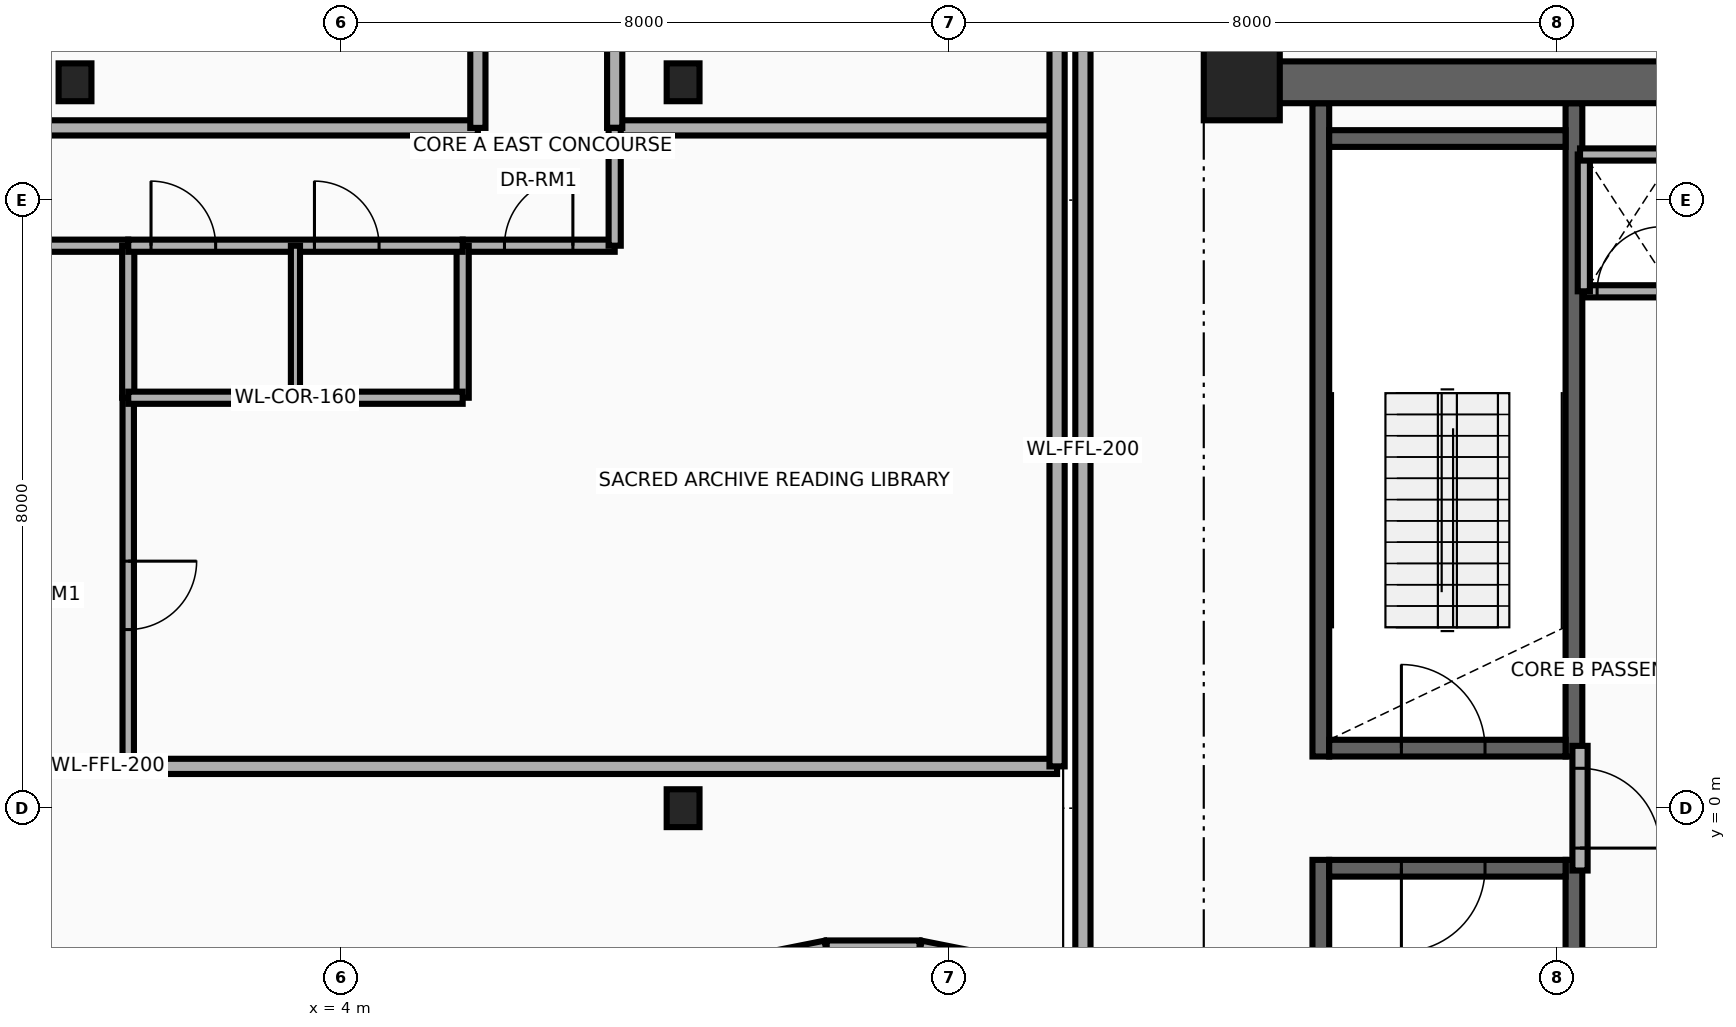
"""IFC4 building model, lengths in metres.
Left out: names, types, materials, properties, quantities, classifications, styles, units other than length and angle.
Written with IfcOpenShell. Run it as: python <this file> out.ifc"""

import sys

from ifc_helpers import new_model, si_unit, direction, frame, frame_2d, origin, origin_2d, place, context, subcontext, project, spatial, rectangle, i_section, extrude, source, transform, mapped, element, fill, save


model = new_model("IFC4")
c1 = context("Model", 3, precision=1e-05, world=origin(), true_north=direction((0.0, 1.0)))
c2 = subcontext(c1, "Body", "Model", "MODEL_VIEW")
j1 = project(units=[si_unit("LENGTHUNIT", "METRE"), si_unit("PLANEANGLEUNIT", "RADIAN")], contexts=[c1])
p1 = place(None, origin())
s1 = spatial("IfcSite", under=j1, at=p1, CompositionType="ELEMENT")
p2 = place(p1, origin())
s2 = spatial("IfcBuilding", under=s1, at=p2, CompositionType="ELEMENT")
p3 = place(p2, frame((0.0, 0.0, 172.3)))
s3 = spatial("IfcBuildingStorey", under=s2, at=p3, CompositionType="ELEMENT", Elevation=172.3)
for number, where, z_axis, x_axis in (
    (1, (16.89, 0.68, 0.0), (0.0, 0.0, 1.0), (0.0, 1.0, 0.0)),
    (2, (20.22, 0.68, 0.0), (0.0, 0.0, 1.0), (0.0, 1.0, 0.0)),
):
    element("IfcWall", number, at=place(p3, frame(where, z_axis=z_axis, x_axis=x_axis)), inside=s3, PredefinedType="SHEAR", context=c2, shape_type="SweptSolid", body=[
        extrude(rectangle(XDim=8.595, YDim=0.22, at=frame_2d((4.297, 0.0))), origin(), (0.0, 0.0, 1.0), 3.93),
    ])
p4 = place(p3, frame((17.0, 0.79, 0.0), z_axis=(0.0, 0.0, 1.0), x_axis=(1.0, 0.0, 0.0)))
e3 = element("IfcWall", 3, at=p4, inside=s3, PredefinedType="SHEAR", context=c2, shape_type="SweptSolid", body=[
    extrude(rectangle(XDim=3.11, YDim=0.22, at=frame_2d((1.555, 0.0))), origin(), (0.0, 0.0, 1.0), 3.93),
])
p5 = place(p4, frame((0.95, 0.0, 0.0)))
e4 = element("IfcOpeningElement", 4, at=p5, cuts=e3, PredefinedType="OPENING", context=c2, shape_type="SweptSolid", body=[
    extrude(rectangle(XDim=1.1, YDim=2.15, at=frame_2d((0.55, 1.075))), frame((0.0, 0.125, 0.0), z_axis=(0.0, -1.0, 0.0), x_axis=(1.0, 0.0, 0.0)), (0.0, 0.0, 1.0), 0.25),
])
p6 = place(p3, frame((17.0, 8.81, 0.0), z_axis=(0.0, 0.0, 1.0), x_axis=(1.0, 0.0, 0.0)))
e5 = element("IfcWall", 5, at=p6, inside=s3, PredefinedType="SHEAR", context=c2, shape_type="SweptSolid", body=[
    extrude(rectangle(XDim=3.11, YDim=0.22, at=frame_2d((1.555, 0.0))), origin(), (0.0, 0.0, 1.0), 3.93),
])
for number, where, z_axis, x_axis in (
    (6, (16.89, -9.275, 0.0), (0.0, 0.0, 1.0), (0.0, 1.0, 0.0)),
    (7, (20.22, -9.275, 0.0), (0.0, 0.0, 1.0), (0.0, 1.0, 0.0)),
):
    element("IfcWall", number, at=place(p3, frame(where, z_axis=z_axis, x_axis=x_axis)), inside=s3, PredefinedType="SHEAR", context=c2, shape_type="SweptSolid", body=[
        extrude(rectangle(XDim=8.595, YDim=0.22, at=frame_2d((4.297, 0.0))), origin(), (0.0, 0.0, 1.0), 3.93),
    ])
p7 = place(p3, frame((17.0, -0.79, 0.0), z_axis=(0.0, 0.0, 1.0), x_axis=(1.0, 0.0, 0.0)))
e8 = element("IfcWall", 8, at=p7, inside=s3, PredefinedType="SHEAR", context=c2, shape_type="SweptSolid", body=[
    extrude(rectangle(XDim=3.11, YDim=0.22, at=frame_2d((1.555, 0.0))), origin(), (0.0, 0.0, 1.0), 3.93),
])
p8 = place(p7, frame((0.95, 0.0, 0.0)))
e9 = element("IfcOpeningElement", 9, at=p8, cuts=e8, PredefinedType="OPENING", context=c2, shape_type="SweptSolid", body=[
    extrude(rectangle(XDim=1.1, YDim=2.15, at=frame_2d((0.55, 1.075))), frame((0.0, 0.125, 0.0), z_axis=(0.0, -1.0, 0.0), x_axis=(1.0, 0.0, 0.0)), (0.0, 0.0, 1.0), 0.25),
])
p9 = place(p3, frame((15.85, 9.55, 0.0), z_axis=(0.0, 0.0, 1.0), x_axis=(1.0, 0.0, 0.0)))
e10 = element("IfcWall", 10, at=p9, inside=s3, PredefinedType="SHEAR", context=c2, shape_type="SweptSolid", body=[
    extrude(rectangle(XDim=9.0, YDim=0.55, at=frame_2d((4.5, 0.0))), origin(), (0.0, 0.0, 1.0), 3.93),
])
m1 = source(origin(), c2, "Body", "SweptSolid", [
    extrude(rectangle(XDim=1.0, YDim=1.0, at=origin_2d()), origin(), (0.0, 0.0, 1.0), 4.25),
])
p10 = place(p3, frame((15.85, 9.55, 0.0), z_axis=(0.0, 0.0, 1.0), x_axis=(1.0, 0.0, 0.0)))
e11 = element("IfcColumn", 11, at=p10, inside=s3, PredefinedType="COLUMN", context=c2, shape_type="MappedRepresentation", body=[
    mapped(m1, transform((0.0, 0.0, 0.0), x_axis=(1.0, 0.0, 0.0), y_axis=(0.0, 1.0, 0.0), z_axis=(0.0, 0.0, 1.0), scale=1.0)),
])
m2 = source(origin(), c2, "Body", "SweptSolid", [
    extrude(i_section(OverallWidth=0.432, OverallDepth=0.498, WebThickness=0.056, FlangeThickness=0.089, at=origin_2d()), origin(), (0.0, 0.0, 1.0), 4.25),
])
for number, where, z_axis, x_axis in (
    (12, (8.5, 0.0, 0.0), (0.0, 0.0, 1.0), (1.0, 0.0, 0.0)),
    (13, (8.5, 9.55, 0.0), (0.0, 0.0, 1.0), (1.0, 0.0, 0.0)),
    (14, (0.5, 9.55, 0.0), (0.0, 0.0, 1.0), (1.0, 0.0, 0.0)),
):
    element("IfcColumn", number, at=place(p3, frame(where, z_axis=z_axis, x_axis=x_axis)), inside=s3, PredefinedType="COLUMN", context=c2, shape_type="MappedRepresentation", body=[
        mapped(m2, transform((0.0, 0.0, 0.0), x_axis=(1.0, 0.0, 0.0), y_axis=(0.0, 1.0, 0.0), z_axis=(0.0, 0.0, 1.0), scale=1.0)),
    ])
p11 = place(p3, frame((12.37, -2.041, 0.0), z_axis=(0.0, 0.0, 1.0), x_axis=(-0.98076219082, 0.195206365311, 0.0)))
e15 = element("IfcWall", 15, at=p11, inside=s3, PredefinedType="SOLIDWALL", context=c2, shape_type="SweptSolid", body=[
    extrude(rectangle(XDim=0.774, YDim=0.3, at=frame_2d((0.387, 0.0))), origin(), (0.0, 0.0, 1.0), 2.715),
])
p12 = place(p3, frame((11.611, -1.89, 0.0), z_axis=(0.0, 0.0, 1.0), x_axis=(-1.0, 0.0, 0.0)))
e16 = element("IfcWall", 16, at=p12, inside=s3, PredefinedType="SOLIDWALL", context=c2, shape_type="SweptSolid", body=[
    extrude(rectangle(XDim=1.222, YDim=0.3, at=frame_2d((0.611, 0.0))), origin(), (0.0, 0.0, 1.0), 3.93),
])
p13 = place(p3, frame((10.389, -1.89, 0.0), z_axis=(0.0, 0.0, 1.0), x_axis=(-0.98076219082, -0.195206365311, 0.0)))
e17 = element("IfcWall", 17, at=p13, inside=s3, PredefinedType="SOLIDWALL", context=c2, shape_type="SweptSolid", body=[
    extrude(rectangle(XDim=0.774, YDim=0.3, at=frame_2d((0.387, 0.0))), origin(), (0.0, 0.0, 1.0), 3.93),
])
p14 = place(p3, frame((20.3, -0.82, 0.0), z_axis=(0.0, 0.0, 1.0), x_axis=(0.0, 1.0, 0.0)))
e18 = element("IfcWall", 18, at=p14, inside=s3, PredefinedType="PARTITIONING", context=c2, shape_type="SweptSolid", body=[
    extrude(rectangle(XDim=1.64, YDim=0.2, at=frame_2d((0.82, 0.0))), origin(), (0.0, 0.0, 1.0), 3.93),
])
p15 = place(p14, frame((0.295, 0.0, 0.0)))
e19 = element("IfcOpeningElement", 19, at=p15, cuts=e18, PredefinedType="OPENING", context=c2, shape_type="SweptSolid", body=[
    extrude(rectangle(XDim=1.05, YDim=2.15, at=frame_2d((0.525, 1.075))), frame((0.0, 0.115, 0.0), z_axis=(0.0, -1.0, 0.0), x_axis=(1.0, 0.0, 0.0)), (0.0, 0.0, 1.0), 0.23),
])
p16 = place(p3, frame((20.35, 6.8, 0.0), z_axis=(0.0, 0.0, 1.0), x_axis=(1.0, 0.0, 0.0)))
e20 = element("IfcWall", 20, at=p16, inside=s3, PredefinedType="PARTITIONING", context=c2, shape_type="SweptSolid", body=[
    extrude(rectangle(XDim=1.2, YDim=0.16, at=frame_2d((0.6, 0.0))), origin(), (0.0, 0.0, 1.0), 3.93),
])
p17 = place(p16, frame((0.175, 0.0, 0.0)))
e21 = element("IfcOpeningElement", 21, at=p17, cuts=e20, PredefinedType="OPENING", context=c2, shape_type="SweptSolid", body=[
    extrude(rectangle(XDim=0.85, YDim=2.05, at=frame_2d((0.425, 1.025))), frame((0.0, 0.095, 0.0), z_axis=(0.0, -1.0, 0.0), x_axis=(1.0, 0.0, 0.0)), (0.0, 0.0, 1.0), 0.19),
])
p18 = place(p3, frame((20.35, 6.8, 0.0), z_axis=(0.0, 0.0, 1.0), x_axis=(0.0, 1.0, 0.0)))
e22 = element("IfcWall", 22, at=p18, inside=s3, PredefinedType="PARTITIONING", context=c2, shape_type="SweptSolid", body=[
    extrude(rectangle(XDim=1.8, YDim=0.16, at=frame_2d((0.9, 0.0))), origin(), (0.0, 0.0, 1.0), 3.93),
])
p19 = place(p3, frame((20.3, 8.6, 0.0), z_axis=(0.0, 0.0, 1.0), x_axis=(1.0, 0.0, 0.0)))
e23 = element("IfcWall", 23, at=p19, inside=s3, PredefinedType="PARTITIONING", context=c2, shape_type="SweptSolid", body=[
    extrude(rectangle(XDim=1.82, YDim=0.16, at=frame_2d((0.91, 0.0))), origin(), (0.0, 0.0, 1.0), 3.93),
])
p20 = place(p3, frame((-11.55, 0.55, 0.0), z_axis=(0.0, 0.0, 1.0), x_axis=(1.0, 0.0, 0.0)))
e24 = element("IfcWall", 24, at=p20, inside=s3, PredefinedType="PARTITIONING", context=c2, shape_type="SweptSolid", body=[
    extrude(rectangle(XDim=24.97, YDim=0.2, at=frame_2d((12.485, 0.0))), origin(), (0.0, 0.0, 1.0), 2.715),
])
p21 = place(p3, frame((-11.55, 8.95, 0.0), z_axis=(0.0, 0.0, 1.0), x_axis=(1.0, 0.0, 0.0)))
e25 = element("IfcWall", 25, at=p21, inside=s3, PredefinedType="PARTITIONING", context=c2, shape_type="SweptSolid", body=[
    extrude(rectangle(XDim=17.35, YDim=0.2, at=frame_2d((8.675, 0.0))), origin(), (0.0, 0.0, 1.0), 2.715),
])
p22 = place(p3, frame((7.6, 8.95, 0.0), z_axis=(0.0, 0.0, 1.0), x_axis=(1.0, 0.0, 0.0)))
e26 = element("IfcWall", 26, at=p22, inside=s3, PredefinedType="PARTITIONING", context=c2, shape_type="SweptSolid", body=[
    extrude(rectangle(XDim=5.82, YDim=0.2, at=frame_2d((2.91, 0.0))), origin(), (0.0, 0.0, 1.0), 2.715),
])
for number, where, z_axis, x_axis in (
    (27, (5.8, 8.95, 0.0), (0.0, 0.0, 1.0), (0.0, 1.0, 0.0)),
    (28, (7.6, 8.95, 0.0), (0.0, 0.0, 1.0), (0.0, 1.0, 0.0)),
):
    element("IfcWall", number, at=place(p3, frame(where, z_axis=z_axis, x_axis=x_axis)), inside=s3, PredefinedType="PARTITIONING", context=c2, shape_type="SweptSolid", body=[
        extrude(rectangle(XDim=2.47, YDim=0.2, at=frame_2d((1.235, 0.0))), origin(), (0.0, 0.0, 1.0), 2.715),
    ])
p23 = place(p3, frame((13.42, 0.55, 0.0), z_axis=(0.0, 0.0, 1.0), x_axis=(0.0, 1.0, 0.0)))
e29 = element("IfcWall", 29, at=p23, inside=s3, PredefinedType="PARTITIONING", context=c2, shape_type="SweptSolid", body=[
    extrude(rectangle(XDim=10.87, YDim=0.2, at=frame_2d((5.435, 0.0))), origin(), (0.0, 0.0, 1.0), 2.715),
])
p24 = place(p3, frame((13.76, -2.0, 0.0), z_axis=(0.0, 0.0, 1.0), x_axis=(0.0, 1.0, 0.0)))
e30 = element("IfcWall", 30, at=p24, inside=s3, PredefinedType="PARTITIONING", context=c2, shape_type="SweptSolid", body=[
    extrude(rectangle(XDim=13.42, YDim=0.2, at=frame_2d((6.71, 0.0))), origin(), (0.0, 0.0, 1.0), 2.715),
])
p25 = place(p3, frame((-10.05, 7.4, 0.0), z_axis=(0.0, 0.0, 1.0), x_axis=(1.0, 0.0, 0.0)))
e31 = element("IfcWall", 31, at=p25, inside=s3, PredefinedType="PARTITIONING", context=c2, shape_type="SweptSolid", body=[
    extrude(rectangle(XDim=11.25, YDim=0.16, at=frame_2d((5.625, 0.0))), origin(), (0.0, 0.0, 1.0), 2.915),
])
p26 = place(p25, frame((4.2, 0.0, 0.0)))
e32 = element("IfcOpeningElement", 32, at=p26, cuts=e31, PredefinedType="OPENING", context=c2, shape_type="SweptSolid", body=[
    extrude(rectangle(XDim=1.8, YDim=2.15, at=frame_2d((0.9, 1.075))), frame((0.0, 0.095, 0.0), z_axis=(0.0, -1.0, 0.0), x_axis=(1.0, 0.0, 0.0)), (0.0, 0.0, 1.0), 0.19),
])
p27 = place(p3, frame((5.6, 7.4, 0.0), z_axis=(0.0, 0.0, 1.0), x_axis=(1.0, 0.0, 0.0)))
e33 = element("IfcWall", 33, at=p27, inside=s3, PredefinedType="PARTITIONING", context=c2, shape_type="SweptSolid", body=[
    extrude(rectangle(XDim=2.0, YDim=0.16, at=frame_2d((1.0, 0.0))), origin(), (0.0, 0.0, 1.0), 3.93),
])
p28 = place(p27, frame((0.55, 0.0, 0.0)))
e34 = element("IfcOpeningElement", 34, at=p28, cuts=e33, PredefinedType="OPENING", context=c2, shape_type="SweptSolid", body=[
    extrude(rectangle(XDim=0.9, YDim=2.1, at=frame_2d((0.45, 1.05))), frame((0.0, 0.095, 0.0), z_axis=(0.0, -1.0, 0.0), x_axis=(1.0, 0.0, 0.0)), (0.0, 0.0, 1.0), 0.19),
])
p29 = place(p3, frame((7.6, 7.4, 0.0), z_axis=(0.0, 0.0, 1.0), x_axis=(0.0, 1.0, 0.0)))
e35 = element("IfcWall", 35, at=p29, inside=s3, PredefinedType="PARTITIONING", context=c2, shape_type="SweptSolid", body=[
    extrude(rectangle(XDim=1.55, YDim=0.16, at=frame_2d((0.775, 0.0))), origin(), (0.0, 0.0, 1.0), 2.715),
])
p30 = place(p3, frame((1.2, 0.55, 0.0), z_axis=(0.0, 0.0, 1.0), x_axis=(0.0, 1.0, 0.0)))
e36 = element("IfcWall", 36, at=p30, inside=s3, PredefinedType="PARTITIONING", context=c2, shape_type="SweptSolid", body=[
    extrude(rectangle(XDim=4.85, YDim=0.15, at=frame_2d((2.425, 0.0))), origin(), (0.0, 0.0, 1.0), 2.715),
])
p31 = place(p30, frame((1.8, 0.0, 0.0)))
e37 = element("IfcOpeningElement", 37, at=p31, cuts=e36, PredefinedType="OPENING", context=c2, shape_type="SweptSolid", body=[
    extrude(rectangle(XDim=0.9, YDim=2.1, at=frame_2d((0.45, 1.05))), frame((0.0, 0.09, 0.0), z_axis=(0.0, -1.0, 0.0), x_axis=(1.0, 0.0, 0.0)), (0.0, 0.0, 1.0), 0.18),
])
for number, where, z_axis, x_axis in (
    (38, (1.2, 5.4, 0.0), (0.0, 0.0, 1.0), (0.0, 1.0, 0.0)),
    (39, (5.6, 5.4, 0.0), (0.0, 0.0, 1.0), (0.0, 1.0, 0.0)),
):
    element("IfcWall", number, at=place(p3, frame(where, z_axis=z_axis, x_axis=x_axis)), inside=s3, PredefinedType="PARTITIONING", context=c2, shape_type="SweptSolid", body=[
        extrude(rectangle(XDim=2.0, YDim=0.16, at=frame_2d((1.0, 0.0))), origin(), (0.0, 0.0, 1.0), 3.93),
    ])
p32 = place(p3, frame((1.2, 5.4, 0.0), z_axis=(0.0, 0.0, 1.0), x_axis=(1.0, 0.0, 0.0)))
e40 = element("IfcWall", 40, at=p32, inside=s3, PredefinedType="PARTITIONING", context=c2, shape_type="SweptSolid", body=[
    extrude(rectangle(XDim=4.4, YDim=0.16, at=frame_2d((2.2, 0.0))), origin(), (0.0, 0.0, 1.0), 3.93),
])
p33 = place(p3, frame((1.2, 7.4, 0.0), z_axis=(0.0, 0.0, 1.0), x_axis=(1.0, 0.0, 0.0)))
e41 = element("IfcWall", 41, at=p33, inside=s3, PredefinedType="PARTITIONING", context=c2, shape_type="SweptSolid", body=[
    extrude(rectangle(XDim=4.4, YDim=0.16, at=frame_2d((2.2, 0.0))), origin(), (0.0, 0.0, 1.0), 3.93),
])
p34 = place(p33, frame((0.3, 0.0, 0.0)))
e42 = element("IfcOpeningElement", 42, at=p34, cuts=e41, PredefinedType="OPENING", context=c2, shape_type="SweptSolid", body=[
    extrude(rectangle(XDim=0.85, YDim=2.1, at=frame_2d((0.425, 1.05))), frame((0.0, 0.095, 0.0), z_axis=(0.0, -1.0, 0.0), x_axis=(1.0, 0.0, 0.0)), (0.0, 0.0, 1.0), 0.19),
])
p35 = place(p33, frame((2.45, 0.0, 0.0)))
e43 = element("IfcOpeningElement", 43, at=p35, cuts=e41, PredefinedType="OPENING", context=c2, shape_type="SweptSolid", body=[
    extrude(rectangle(XDim=0.85, YDim=2.1, at=frame_2d((0.425, 1.05))), frame((0.0, 0.095, 0.0), z_axis=(0.0, -1.0, 0.0), x_axis=(1.0, 0.0, 0.0)), (0.0, 0.0, 1.0), 0.19),
])
p36 = place(p3, frame((3.4, 5.4, 0.0), z_axis=(0.0, 0.0, 1.0), x_axis=(0.0, 1.0, 0.0)))
e44 = element("IfcWall", 44, at=p36, inside=s3, PredefinedType="PARTITIONING", context=c2, shape_type="SweptSolid", body=[
    extrude(rectangle(XDim=2.0, YDim=0.12, at=frame_2d((1.0, 0.0))), origin(), (0.0, 0.0, 1.0), 3.93),
])
p37 = place(p15, frame((1.05, 0.0, 0.0), z_axis=(0.0, 0.0, 1.0), x_axis=(-1.0, 0.0, 0.0)))
e45 = element("IfcDoor", 45, at=p37, inside=s3, OperationType="SINGLE_SWING_LEFT", PredefinedType="DOOR", context=c2, shape_type="SweptSolid", body=[
    extrude(rectangle(XDim=1.05, YDim=2.15, at=frame_2d((0.525, 1.075))), frame((0.0, 0.025, 0.0), z_axis=(0.0, -1.0, 0.0), x_axis=(1.0, 0.0, 0.0)), (0.0, 0.0, 1.0), 0.05),
])
fill(e19, e45)
p38 = place(p5, origin())
e46 = element("IfcDoor", 46, at=p38, inside=s3, OperationType="SINGLE_SWING_RIGHT", PredefinedType="DOOR", context=c2, shape_type="SweptSolid", body=[
    extrude(rectangle(XDim=1.1, YDim=2.15, at=frame_2d((0.55, 1.075))), frame((0.0, 0.025, 0.0), z_axis=(0.0, -1.0, 0.0), x_axis=(1.0, 0.0, 0.0)), (0.0, 0.0, 1.0), 0.05),
])
fill(e4, e46)
p39 = place(p8, frame((1.1, 0.0, 0.0), z_axis=(0.0, 0.0, 1.0), x_axis=(-1.0, 0.0, 0.0)))
e47 = element("IfcDoor", 47, at=p39, inside=s3, OperationType="SINGLE_SWING_LEFT", PredefinedType="DOOR", context=c2, shape_type="SweptSolid", body=[
    extrude(rectangle(XDim=1.1, YDim=2.15, at=frame_2d((0.55, 1.075))), frame((0.0, 0.025, 0.0), z_axis=(0.0, -1.0, 0.0), x_axis=(1.0, 0.0, 0.0)), (0.0, 0.0, 1.0), 0.05),
])
fill(e9, e47)
p40 = place(p17, origin())
e48 = element("IfcDoor", 48, at=p40, inside=s3, OperationType="SINGLE_SWING_RIGHT", PredefinedType="DOOR", context=c2, shape_type="SweptSolid", body=[
    extrude(rectangle(XDim=0.85, YDim=2.05, at=frame_2d((0.425, 1.025))), frame((0.0, 0.025, 0.0), z_axis=(0.0, -1.0, 0.0), x_axis=(1.0, 0.0, 0.0)), (0.0, 0.0, 1.0), 0.05),
])
fill(e21, e48)
p41 = place(p28, origin())
e49 = element("IfcDoor", 49, at=p41, inside=s3, OperationType="SINGLE_SWING_RIGHT", PredefinedType="DOOR", context=c2, shape_type="SweptSolid", body=[
    extrude(rectangle(XDim=0.9, YDim=2.1, at=frame_2d((0.45, 1.05))), frame((0.0, 0.025, 0.0), z_axis=(0.0, -1.0, 0.0), x_axis=(1.0, 0.0, 0.0)), (0.0, 0.0, 1.0), 0.05),
])
fill(e34, e49)
p42 = place(p31, frame((0.9, 0.0, 0.0), z_axis=(0.0, 0.0, 1.0), x_axis=(-1.0, 0.0, 0.0)))
e50 = element("IfcDoor", 50, at=p42, inside=s3, OperationType="SINGLE_SWING_LEFT", PredefinedType="DOOR", context=c2, shape_type="SweptSolid", body=[
    extrude(rectangle(XDim=0.9, YDim=2.1, at=frame_2d((0.45, 1.05))), frame((0.0, 0.025, 0.0), z_axis=(0.0, -1.0, 0.0), x_axis=(1.0, 0.0, 0.0)), (0.0, 0.0, 1.0), 0.05),
])
fill(e37, e50)
p43 = place(p34, origin())
e51 = element("IfcDoor", 51, at=p43, inside=s3, OperationType="SINGLE_SWING_RIGHT", PredefinedType="DOOR", context=c2, shape_type="SweptSolid", body=[
    extrude(rectangle(XDim=0.85, YDim=2.1, at=frame_2d((0.425, 1.05))), frame((0.0, 0.025, 0.0), z_axis=(0.0, -1.0, 0.0), x_axis=(1.0, 0.0, 0.0)), (0.0, 0.0, 1.0), 0.05),
])
fill(e42, e51)
p44 = place(p35, origin())
e52 = element("IfcDoor", 52, at=p44, inside=s3, OperationType="SINGLE_SWING_LEFT", PredefinedType="DOOR", context=c2, shape_type="SweptSolid", body=[
    extrude(rectangle(XDim=0.85, YDim=2.1, at=frame_2d((0.425, 1.05))), frame((0.0, 0.025, 0.0), z_axis=(0.0, -1.0, 0.0), x_axis=(1.0, 0.0, 0.0)), (0.0, 0.0, 1.0), 0.05),
])
fill(e43, e52)
save(model, sys.argv[1])
